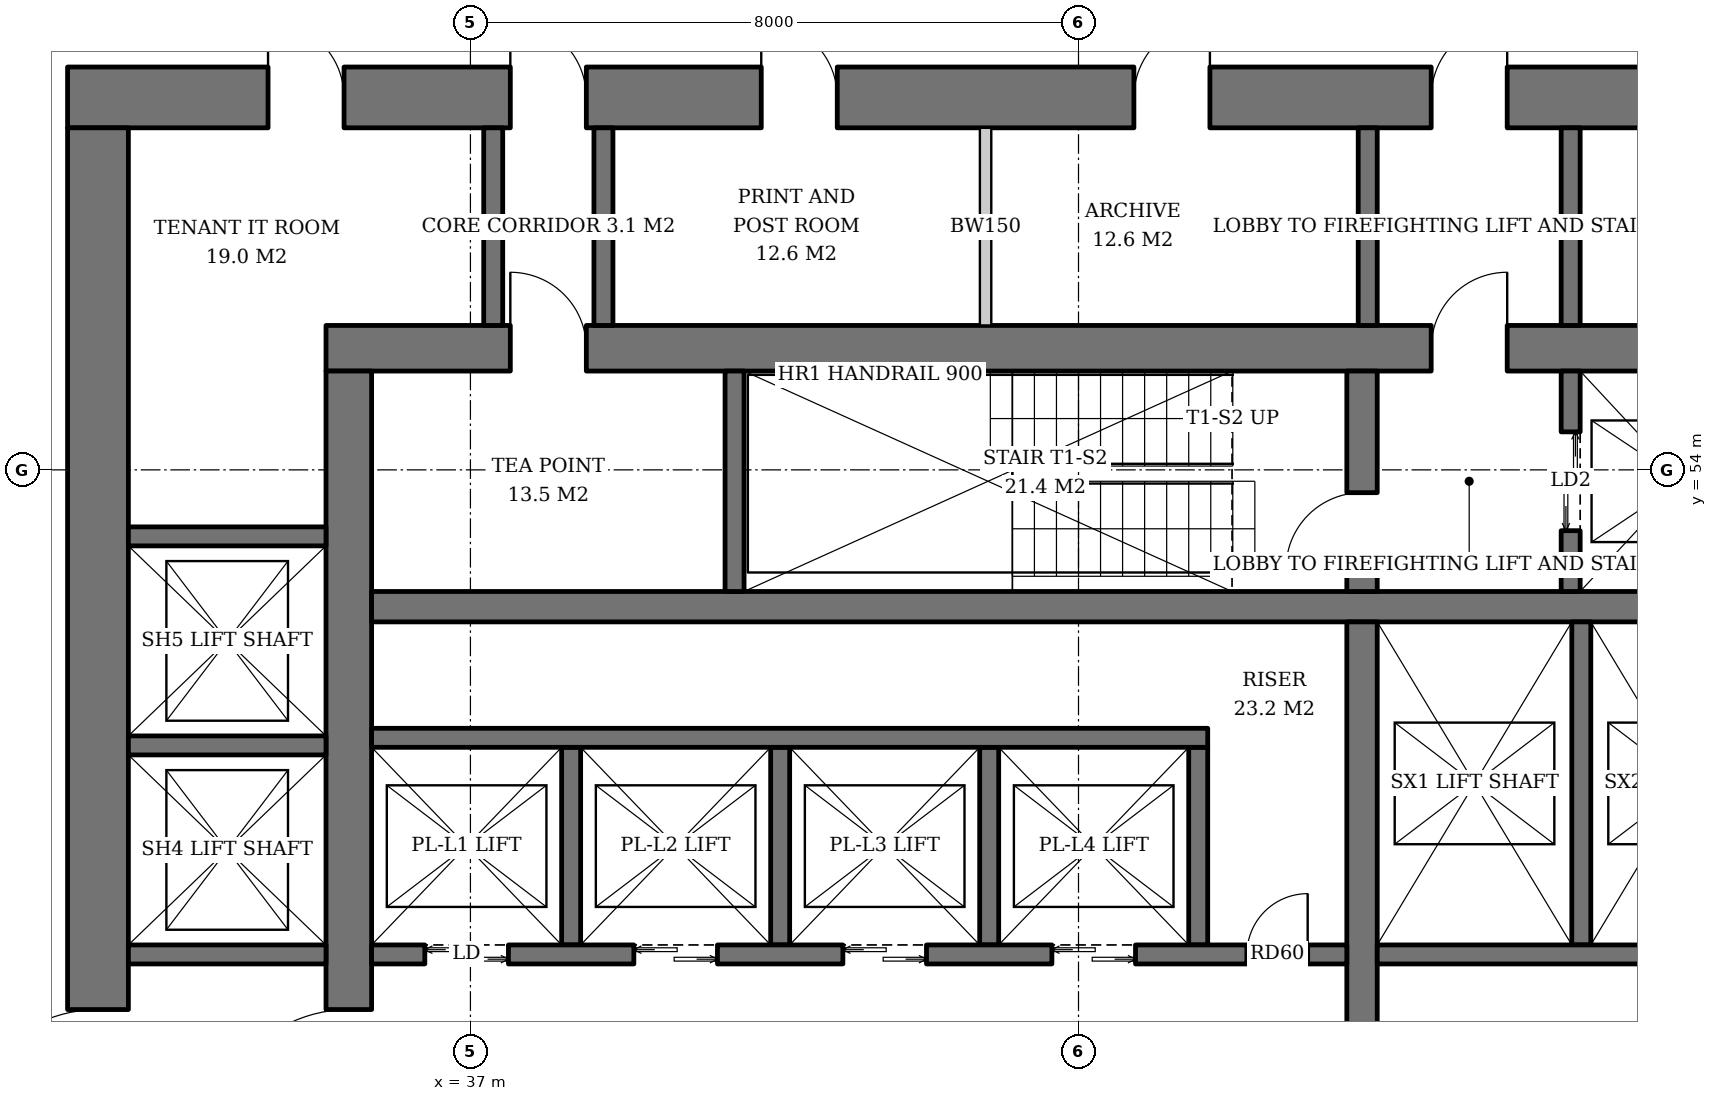
"""IFC4 building model, lengths in metres.
Left out: names, types, materials, properties, quantities, classifications, styles, units other than length and angle.
Written with IfcOpenShell. Run it as: python <this file> out.ifc"""

import sys

from ifc_helpers import new_model, si_unit, direction, frame, frame_2d, origin, place, context, subcontext, project, spatial, rectangle, extrude, element, fill, save


model = new_model("IFC4")
c1 = context("Model", 3, precision=1e-05, world=origin(), true_north=direction((0.0, 1.0)))
c2 = subcontext(c1, "Body", "Model", "MODEL_VIEW")
j1 = project(units=[si_unit("LENGTHUNIT", "METRE"), si_unit("PLANEANGLEUNIT", "RADIAN")], contexts=[c1])
p1 = place(None, origin())
s1 = spatial("IfcSite", under=j1, at=p1, CompositionType="ELEMENT")
p2 = place(p1, origin())
s2 = spatial("IfcBuilding", under=s1, at=p2, CompositionType="ELEMENT")
p3 = place(p2, frame((0.0, 0.0, 24.8)))
s3 = spatial("IfcBuildingStorey", under=s2, at=p3, CompositionType="ELEMENT", Elevation=24.8)
p4 = place(p3, frame((35.1, 55.6, 0.0), z_axis=(0.0, 0.0, 1.0), x_axis=(1.0, 0.0, 0.0)))
e1 = element("IfcWall", 1, at=p4, inside=s3, PredefinedType="SHEAR", context=c2, shape_type="SweptSolid", body=[
    extrude(rectangle(XDim=19.8, YDim=0.6, at=frame_2d((9.9, 0.0))), origin(), (0.0, 0.0, 1.0), 3.8),
])
p5 = place(p4, frame((14.54, 0.0, 0.0)))
e2 = element("IfcOpeningElement", 2, at=p5, cuts=e1, PredefinedType="OPENING", context=c2, shape_type="SweptSolid", body=[
    extrude(rectangle(XDim=1.0, YDim=2.1, at=frame_2d((0.5, 1.05))), frame((0.0, 0.31, 0.0), z_axis=(0.0, -1.0, 0.0), x_axis=(1.0, 0.0, 0.0)), (0.0, 0.0, 1.0), 0.62),
])
p6 = place(p4, frame((2.425, 0.0, 0.0)))
e3 = element("IfcOpeningElement", 3, at=p6, cuts=e1, PredefinedType="OPENING", context=c2, shape_type="SweptSolid", body=[
    extrude(rectangle(XDim=1.0, YDim=2.1, at=frame_2d((0.5, 1.05))), frame((0.0, 0.31, 0.0), z_axis=(0.0, -1.0, 0.0), x_axis=(1.0, 0.0, 0.0)), (0.0, 0.0, 1.0), 0.62),
])
p7 = place(p3, frame((35.4, 36.7, 0.0), z_axis=(0.0, 0.0, 1.0), x_axis=(0.0, 1.0, 0.0)))
e4 = element("IfcWall", 4, at=p7, inside=s3, PredefinedType="SHEAR", context=c2, shape_type="SweptSolid", body=[
    extrude(rectangle(XDim=18.6, YDim=0.6, at=frame_2d((9.3, 0.0))), origin(), (0.0, 0.0, 1.0), 3.8),
])
p8 = place(p7, frame((8.4, 0.0, 0.0)))
e5 = element("IfcOpeningElement", 5, at=p8, cuts=e4, PredefinedType="OPENING", context=c2, shape_type="SweptSolid", body=[
    extrude(rectangle(XDim=1.8, YDim=2.4, at=frame_2d((0.9, 1.2))), frame((0.0, 0.31, 0.0), z_axis=(0.0, -1.0, 0.0), x_axis=(1.0, 0.0, 0.0)), (0.0, 0.0, 1.0), 0.62),
])
p9 = place(p3, frame((31.7, 58.9, 0.0), z_axis=(0.0, 0.0, 1.0), x_axis=(1.0, 0.0, 0.0)))
e6 = element("IfcWall", 6, at=p9, inside=s3, PredefinedType="SHEAR", context=c2, shape_type="SweptSolid", body=[
    extrude(rectangle(XDim=26.6, YDim=0.8, at=frame_2d((13.3, 0.0))), origin(), (0.0, 0.0, 1.0), 3.8),
])
p10 = place(p9, frame((17.94, 0.0, 0.0)))
e7 = element("IfcOpeningElement", 7, at=p10, cuts=e6, PredefinedType="OPENING", context=c2, shape_type="SweptSolid", body=[
    extrude(rectangle(XDim=1.0, YDim=2.1, at=frame_2d((0.5, 1.05))), frame((0.0, 0.41, 0.0), z_axis=(0.0, -1.0, 0.0), x_axis=(1.0, 0.0, 0.0)), (0.0, 0.0, 1.0), 0.82),
])
p11 = place(p9, frame((5.825, 0.0, 0.0)))
e8 = element("IfcOpeningElement", 8, at=p11, cuts=e6, PredefinedType="OPENING", context=c2, shape_type="SweptSolid", body=[
    extrude(rectangle(XDim=1.0, YDim=2.1, at=frame_2d((0.5, 1.05))), frame((0.0, 0.41, 0.0), z_axis=(0.0, -1.0, 0.0), x_axis=(1.0, 0.0, 0.0)), (0.0, 0.0, 1.0), 0.82),
])
p12 = place(p9, frame((2.637, 0.0, 0.0)))
e9 = element("IfcOpeningElement", 9, at=p12, cuts=e6, PredefinedType="OPENING", context=c2, shape_type="SweptSolid", body=[
    extrude(rectangle(XDim=1.0, YDim=2.1, at=frame_2d((0.5, 1.05))), frame((0.0, 0.41, 0.0), z_axis=(0.0, -1.0, 0.0), x_axis=(1.0, 0.0, 0.0)), (0.0, 0.0, 1.0), 0.82),
])
p13 = place(p9, frame((9.126, 0.0, 0.0)))
e10 = element("IfcOpeningElement", 10, at=p13, cuts=e6, PredefinedType="OPENING", context=c2, shape_type="SweptSolid", body=[
    extrude(rectangle(XDim=1.0, YDim=2.1, at=frame_2d((0.5, 1.05))), frame((0.0, 0.41, 0.0), z_axis=(0.0, -1.0, 0.0), x_axis=(1.0, 0.0, 0.0)), (0.0, 0.0, 1.0), 0.82),
])
p14 = place(p9, frame((14.029, 0.0, 0.0)))
e11 = element("IfcOpeningElement", 11, at=p14, cuts=e6, PredefinedType="OPENING", context=c2, shape_type="SweptSolid", body=[
    extrude(rectangle(XDim=1.0, YDim=2.1, at=frame_2d((0.5, 1.05))), frame((0.0, 0.41, 0.0), z_axis=(0.0, -1.0, 0.0), x_axis=(1.0, 0.0, 0.0)), (0.0, 0.0, 1.0), 0.82),
])
p15 = place(p9, frame((22.35, 0.0, 0.0)))
e12 = element("IfcOpeningElement", 12, at=p15, cuts=e6, PredefinedType="OPENING", context=c2, shape_type="SweptSolid", body=[
    extrude(rectangle(XDim=1.0, YDim=2.1, at=frame_2d((0.5, 1.05))), frame((0.0, 0.41, 0.0), z_axis=(0.0, -1.0, 0.0), x_axis=(1.0, 0.0, 0.0)), (0.0, 0.0, 1.0), 0.82),
])
p16 = place(p3, frame((32.1, 33.5, 0.0), z_axis=(0.0, 0.0, 1.0), x_axis=(0.0, 1.0, 0.0)))
e13 = element("IfcWall", 13, at=p16, inside=s3, PredefinedType="SHEAR", context=c2, shape_type="SweptSolid", body=[
    extrude(rectangle(XDim=25.0, YDim=0.8, at=frame_2d((12.5, 0.0))), origin(), (0.0, 0.0, 1.0), 3.8),
])
p17 = place(p16, frame((11.6, 0.0, 0.0)))
e14 = element("IfcOpeningElement", 14, at=p17, cuts=e13, PredefinedType="OPENING", context=c2, shape_type="SweptSolid", body=[
    extrude(rectangle(XDim=1.8, YDim=2.4, at=frame_2d((0.9, 1.2))), frame((0.0, 0.41, 0.0), z_axis=(0.0, -1.0, 0.0), x_axis=(1.0, 0.0, 0.0)), (0.0, 0.0, 1.0), 0.82),
])
p18 = place(p3, frame((35.7, 52.2, 0.0), z_axis=(0.0, 0.0, 1.0), x_axis=(1.0, 0.0, 0.0)))
e15 = element("IfcWall", 15, at=p18, inside=s3, PredefinedType="SHEAR", context=c2, shape_type="SweptSolid", body=[
    extrude(rectangle(XDim=18.6, YDim=0.4, at=frame_2d((9.3, 0.0))), origin(), (0.0, 0.0, 1.0), 3.8),
])
p19 = place(p3, frame((48.73, 40.0, 0.0), z_axis=(0.0, 0.0, 1.0), x_axis=(0.0, 1.0, 0.0)))
e16 = element("IfcWall", 16, at=p19, inside=s3, PredefinedType="SHEAR", context=c2, shape_type="SweptSolid", body=[
    extrude(rectangle(XDim=12.0, YDim=0.4, at=frame_2d((6.0, 0.0))), origin(), (0.0, 0.0, 1.0), 3.8),
])
p20 = place(p3, frame((48.73, 52.4, 0.0), z_axis=(0.0, 0.0, 1.0), x_axis=(0.0, 1.0, 0.0)))
e17 = element("IfcWall", 17, at=p20, inside=s3, PredefinedType="SHEAR", context=c2, shape_type="SweptSolid", body=[
    extrude(rectangle(XDim=2.9, YDim=0.4, at=frame_2d((1.45, 0.0))), origin(), (0.0, 0.0, 1.0), 3.8),
])
p21 = place(p20, frame((0.3, 0.0, 0.0)))
e18 = element("IfcOpeningElement", 18, at=p21, cuts=e17, PredefinedType="OPENING", context=c2, shape_type="SweptSolid", body=[
    extrude(rectangle(XDim=1.0, YDim=2.1, at=frame_2d((0.5, 1.05))), frame((0.0, 0.21, 0.0), z_axis=(0.0, -1.0, 0.0), x_axis=(1.0, 0.0, 0.0)), (0.0, 0.0, 1.0), 0.42),
])
p22 = place(p3, frame((40.475, 52.4, 0.0), z_axis=(0.0, 0.0, 1.0), x_axis=(0.0, 1.0, 0.0)))
e19 = element("IfcWall", 19, at=p22, inside=s3, PredefinedType="SHEAR", context=c2, shape_type="SweptSolid", body=[
    extrude(rectangle(XDim=2.9, YDim=0.25, at=frame_2d((1.45, 0.0))), origin(), (0.0, 0.0, 1.0), 3.8),
])
p23 = place(p3, frame((51.475, 52.4, 0.0), z_axis=(0.0, 0.0, 1.0), x_axis=(0.0, 1.0, 0.0)))
e20 = element("IfcWall", 20, at=p23, inside=s3, PredefinedType="SHEAR", context=c2, shape_type="SweptSolid", body=[
    extrude(rectangle(XDim=2.9, YDim=0.25, at=frame_2d((1.45, 0.0))), origin(), (0.0, 0.0, 1.0), 3.8),
])
p24 = place(p23, frame((0.8, 0.0, 0.0)))
e21 = element("IfcOpeningElement", 21, at=p24, cuts=e20, PredefinedType="OPENING", context=c2, shape_type="SweptSolid", body=[
    extrude(rectangle(XDim=1.3, YDim=2.2, at=frame_2d((0.65, 1.1))), frame((0.0, 0.135, 0.0), z_axis=(0.0, -1.0, 0.0), x_axis=(1.0, 0.0, 0.0)), (0.0, 0.0, 1.0), 0.27),
])
for number, where, z_axis, x_axis in (
    (22, (38.325, 47.75, 0.0), (0.0, 0.0, 1.0), (0.0, 1.0, 0.0)),
    (23, (41.075, 47.75, 0.0), (0.0, 0.0, 1.0), (0.0, 1.0, 0.0)),
    (24, (43.825, 47.75, 0.0), (0.0, 0.0, 1.0), (0.0, 1.0, 0.0)),
    (25, (46.575, 47.75, 0.0), (0.0, 0.0, 1.0), (0.0, 1.0, 0.0)),
):
    element("IfcWall", number, at=place(p3, frame(where, z_axis=z_axis, x_axis=x_axis)), inside=s3, PredefinedType="SHEAR", context=c2, shape_type="SweptSolid", body=[
        extrude(rectangle(XDim=2.6, YDim=0.25, at=frame_2d((1.3, 0.0))), origin(), (0.0, 0.0, 1.0), 3.8),
    ])
p25 = place(p3, frame((35.7, 50.475, 0.0), z_axis=(0.0, 0.0, 1.0), x_axis=(1.0, 0.0, 0.0)))
e26 = element("IfcWall", 26, at=p25, inside=s3, PredefinedType="SHEAR", context=c2, shape_type="SweptSolid", body=[
    extrude(rectangle(XDim=11.0, YDim=0.25, at=frame_2d((5.5, 0.0))), origin(), (0.0, 0.0, 1.0), 3.8),
])
p26 = place(p3, frame((35.7, 47.625, 0.0), z_axis=(0.0, 0.0, 1.0), x_axis=(1.0, 0.0, 0.0)))
e27 = element("IfcWall", 27, at=p26, inside=s3, PredefinedType="SHEAR", context=c2, shape_type="SweptSolid", body=[
    extrude(rectangle(XDim=12.83, YDim=0.25, at=frame_2d((6.415, 0.0))), origin(), (0.0, 0.0, 1.0), 3.8),
])
p27 = place(p26, frame((0.7, 0.0, 0.0)))
e28 = element("IfcOpeningElement", 28, at=p27, cuts=e27, PredefinedType="OPENING", context=c2, shape_type="SweptSolid", body=[
    extrude(rectangle(XDim=1.1, YDim=2.2, at=frame_2d((0.55, 1.1))), frame((0.0, 0.135, 0.0), z_axis=(0.0, -1.0, 0.0), x_axis=(1.0, 0.0, 0.0)), (0.0, 0.0, 1.0), 0.27),
])
p28 = place(p26, frame((3.45, 0.0, 0.0)))
e29 = element("IfcOpeningElement", 29, at=p28, cuts=e27, PredefinedType="OPENING", context=c2, shape_type="SweptSolid", body=[
    extrude(rectangle(XDim=1.1, YDim=2.2, at=frame_2d((0.55, 1.1))), frame((0.0, 0.135, 0.0), z_axis=(0.0, -1.0, 0.0), x_axis=(1.0, 0.0, 0.0)), (0.0, 0.0, 1.0), 0.27),
])
p29 = place(p26, frame((6.2, 0.0, 0.0)))
e30 = element("IfcOpeningElement", 30, at=p29, cuts=e27, PredefinedType="OPENING", context=c2, shape_type="SweptSolid", body=[
    extrude(rectangle(XDim=1.1, YDim=2.2, at=frame_2d((0.55, 1.1))), frame((0.0, 0.135, 0.0), z_axis=(0.0, -1.0, 0.0), x_axis=(1.0, 0.0, 0.0)), (0.0, 0.0, 1.0), 0.27),
])
p30 = place(p26, frame((8.95, 0.0, 0.0)))
e31 = element("IfcOpeningElement", 31, at=p30, cuts=e27, PredefinedType="OPENING", context=c2, shape_type="SweptSolid", body=[
    extrude(rectangle(XDim=1.1, YDim=2.2, at=frame_2d((0.55, 1.1))), frame((0.0, 0.135, 0.0), z_axis=(0.0, -1.0, 0.0), x_axis=(1.0, 0.0, 0.0)), (0.0, 0.0, 1.0), 0.27),
])
p31 = place(p26, frame((11.515, 0.0, 0.0)))
e32 = element("IfcOpeningElement", 32, at=p31, cuts=e27, PredefinedType="OPENING", context=c2, shape_type="SweptSolid", body=[
    extrude(rectangle(XDim=0.8, YDim=2.0, at=frame_2d((0.4, 1.0))), frame((0.0, 0.135, 0.0), z_axis=(0.0, -1.0, 0.0), x_axis=(1.0, 0.0, 0.0)), (0.0, 0.0, 1.0), 0.27),
])
p32 = place(p3, frame((51.615, 47.75, 0.0), z_axis=(0.0, 0.0, 1.0), x_axis=(0.0, 1.0, 0.0)))
e33 = element("IfcWall", 33, at=p32, inside=s3, PredefinedType="SHEAR", context=c2, shape_type="SweptSolid", body=[
    extrude(rectangle(XDim=4.25, YDim=0.25, at=frame_2d((2.125, 0.0))), origin(), (0.0, 0.0, 1.0), 3.8),
])
p33 = place(p3, frame((48.93, 47.625, 0.0), z_axis=(0.0, 0.0, 1.0), x_axis=(1.0, 0.0, 0.0)))
e34 = element("IfcWall", 34, at=p33, inside=s3, PredefinedType="SHEAR", context=c2, shape_type="SweptSolid", body=[
    extrude(rectangle(XDim=5.37, YDim=0.25, at=frame_2d((2.685, 0.0))), origin(), (0.0, 0.0, 1.0), 3.8),
])
for number, where, z_axis, x_axis in (
    (35, (32.5, 47.625, 0.0), (0.0, 0.0, 1.0), (1.0, 0.0, 0.0)),
    (36, (32.5, 50.375, 0.0), (0.0, 0.0, 1.0), (1.0, 0.0, 0.0)),
    (37, (32.5, 53.125, 0.0), (0.0, 0.0, 1.0), (1.0, 0.0, 0.0)),
):
    element("IfcWall", number, at=place(p3, frame(where, z_axis=z_axis, x_axis=x_axis)), inside=s3, PredefinedType="SHEAR", context=c2, shape_type="SweptSolid", body=[
        extrude(rectangle(XDim=2.6, YDim=0.25, at=frame_2d((1.3, 0.0))), origin(), (0.0, 0.0, 1.0), 3.8),
    ])
for number, where, z_axis, x_axis in (
    (38, (48.805, 55.9, 0.0), (0.0, 0.0, 1.0), (0.0, 1.0, 0.0)),
    (39, (51.475, 55.9, 0.0), (0.0, 0.0, 1.0), (0.0, 1.0, 0.0)),
    (40, (37.3, 55.9, 0.0), (0.0, 0.0, 1.0), (0.0, 1.0, 0.0)),
    (41, (38.75, 55.9, 0.0), (0.0, 0.0, 1.0), (0.0, 1.0, 0.0)),
):
    element("IfcWall", number, at=place(p3, frame(where, z_axis=z_axis, x_axis=x_axis)), inside=s3, PredefinedType="SOLIDWALL", context=c2, shape_type="SweptSolid", body=[
        extrude(rectangle(XDim=2.6, YDim=0.25, at=frame_2d((1.3, 0.0))), origin(), (0.0, 0.0, 1.0), 3.62),
    ])
p34 = place(p3, frame((43.778, 55.9, 0.0), z_axis=(0.0, 0.0, 1.0), x_axis=(0.0, 1.0, 0.0)))
e42 = element("IfcWall", 42, at=p34, inside=s3, PredefinedType="SOLIDWALL", context=c2, shape_type="SweptSolid", body=[
    extrude(rectangle(XDim=2.6, YDim=0.15, at=frame_2d((1.3, 0.0))), origin(), (0.0, 0.0, 1.0), 3.62),
])
p35 = place(p24, origin())
e43 = element("IfcDoor", 43, at=p35, inside=s3, OperationType="DOUBLE_DOOR_SLIDING", PredefinedType="DOOR", context=c2, shape_type="SweptSolid", body=[
    extrude(rectangle(XDim=1.3, YDim=2.2, at=frame_2d((0.65, 1.1))), frame((0.0, 0.025, 0.0), z_axis=(0.0, -1.0, 0.0), x_axis=(1.0, 0.0, 0.0)), (0.0, 0.0, 1.0), 0.05),
])
fill(e21, e43)
p36 = place(p27, origin())
e44 = element("IfcDoor", 44, at=p36, inside=s3, OperationType="DOUBLE_DOOR_SLIDING", PredefinedType="DOOR", context=c2, shape_type="SweptSolid", body=[
    extrude(rectangle(XDim=1.1, YDim=2.2, at=frame_2d((0.55, 1.1))), frame((0.0, 0.025, 0.0), z_axis=(0.0, -1.0, 0.0), x_axis=(1.0, 0.0, 0.0)), (0.0, 0.0, 1.0), 0.05),
])
fill(e28, e44)
p37 = place(p28, origin())
e45 = element("IfcDoor", 45, at=p37, inside=s3, OperationType="DOUBLE_DOOR_SLIDING", PredefinedType="DOOR", context=c2, shape_type="SweptSolid", body=[
    extrude(rectangle(XDim=1.1, YDim=2.2, at=frame_2d((0.55, 1.1))), frame((0.0, 0.025, 0.0), z_axis=(0.0, -1.0, 0.0), x_axis=(1.0, 0.0, 0.0)), (0.0, 0.0, 1.0), 0.05),
])
fill(e29, e45)
p38 = place(p29, origin())
e46 = element("IfcDoor", 46, at=p38, inside=s3, OperationType="DOUBLE_DOOR_SLIDING", PredefinedType="DOOR", context=c2, shape_type="SweptSolid", body=[
    extrude(rectangle(XDim=1.1, YDim=2.2, at=frame_2d((0.55, 1.1))), frame((0.0, 0.025, 0.0), z_axis=(0.0, -1.0, 0.0), x_axis=(1.0, 0.0, 0.0)), (0.0, 0.0, 1.0), 0.05),
])
fill(e30, e46)
p39 = place(p30, origin())
e47 = element("IfcDoor", 47, at=p39, inside=s3, OperationType="DOUBLE_DOOR_SLIDING", PredefinedType="DOOR", context=c2, shape_type="SweptSolid", body=[
    extrude(rectangle(XDim=1.1, YDim=2.2, at=frame_2d((0.55, 1.1))), frame((0.0, 0.025, 0.0), z_axis=(0.0, -1.0, 0.0), x_axis=(1.0, 0.0, 0.0)), (0.0, 0.0, 1.0), 0.05),
])
fill(e31, e47)
p40 = place(p31, origin())
e48 = element("IfcDoor", 48, at=p40, inside=s3, OperationType="SINGLE_SWING_RIGHT", PredefinedType="DOOR", context=c2, shape_type="SweptSolid", body=[
    extrude(rectangle(XDim=0.8, YDim=2.0, at=frame_2d((0.4, 1.0))), frame((0.0, 0.025, 0.0), z_axis=(0.0, -1.0, 0.0), x_axis=(1.0, 0.0, 0.0)), (0.0, 0.0, 1.0), 0.05),
])
fill(e32, e48)
p41 = place(p21, origin())
e49 = element("IfcDoor", 49, at=p41, inside=s3, OperationType="SINGLE_SWING_LEFT", PredefinedType="DOOR", context=c2, shape_type="SweptSolid", body=[
    extrude(rectangle(XDim=1.0, YDim=2.1, at=frame_2d((0.5, 1.05))), frame((0.0, 0.025, 0.0), z_axis=(0.0, -1.0, 0.0), x_axis=(1.0, 0.0, 0.0)), (0.0, 0.0, 1.0), 0.05),
])
fill(e18, e49)
p42 = place(p5, origin())
e50 = element("IfcDoor", 50, at=p42, inside=s3, OperationType="SINGLE_SWING_RIGHT", PredefinedType="DOOR", context=c2, shape_type="SweptSolid", body=[
    extrude(rectangle(XDim=1.0, YDim=2.1, at=frame_2d((0.5, 1.05))), frame((0.0, 0.025, 0.0), z_axis=(0.0, -1.0, 0.0), x_axis=(1.0, 0.0, 0.0)), (0.0, 0.0, 1.0), 0.05),
])
fill(e2, e50)
p43 = place(p8, origin())
e51 = element("IfcDoor", 51, at=p43, inside=s3, OperationType="DOUBLE_DOOR_SINGLE_SWING", PredefinedType="DOOR", context=c2, shape_type="SweptSolid", body=[
    extrude(rectangle(XDim=1.8, YDim=2.4, at=frame_2d((0.9, 1.2))), frame((0.0, 0.025, 0.0), z_axis=(0.0, -1.0, 0.0), x_axis=(1.0, 0.0, 0.0)), (0.0, 0.0, 1.0), 0.05),
])
fill(e5, e51)
p44 = place(p17, origin())
e52 = element("IfcDoor", 52, at=p44, inside=s3, OperationType="DOUBLE_DOOR_SINGLE_SWING", PredefinedType="DOOR", context=c2, shape_type="SweptSolid", body=[
    extrude(rectangle(XDim=1.8, YDim=2.4, at=frame_2d((0.9, 1.2))), frame((0.0, 0.025, 0.0), z_axis=(0.0, -1.0, 0.0), x_axis=(1.0, 0.0, 0.0)), (0.0, 0.0, 1.0), 0.05),
])
fill(e14, e52)
p45 = place(p10, origin())
e53 = element("IfcDoor", 53, at=p45, inside=s3, OperationType="SINGLE_SWING_RIGHT", PredefinedType="DOOR", context=c2, shape_type="SweptSolid", body=[
    extrude(rectangle(XDim=1.0, YDim=2.1, at=frame_2d((0.5, 1.05))), frame((0.0, 0.025, 0.0), z_axis=(0.0, -1.0, 0.0), x_axis=(1.0, 0.0, 0.0)), (0.0, 0.0, 1.0), 0.05),
])
fill(e7, e53)
p46 = place(p11, origin())
e54 = element("IfcDoor", 54, at=p46, inside=s3, OperationType="SINGLE_SWING_LEFT", PredefinedType="DOOR", context=c2, shape_type="SweptSolid", body=[
    extrude(rectangle(XDim=1.0, YDim=2.1, at=frame_2d((0.5, 1.05))), frame((0.0, 0.025, 0.0), z_axis=(0.0, -1.0, 0.0), x_axis=(1.0, 0.0, 0.0)), (0.0, 0.0, 1.0), 0.05),
])
fill(e8, e54)
p47 = place(p6, origin())
e55 = element("IfcDoor", 55, at=p47, inside=s3, OperationType="SINGLE_SWING_LEFT", PredefinedType="DOOR", context=c2, shape_type="SweptSolid", body=[
    extrude(rectangle(XDim=1.0, YDim=2.1, at=frame_2d((0.5, 1.05))), frame((0.0, -0.24, 0.0), z_axis=(0.0, -1.0, 0.0), x_axis=(1.0, 0.0, 0.0)), (0.0, 0.0, 1.0), 0.05),
])
fill(e3, e55)
p48 = place(p12, origin())
e56 = element("IfcDoor", 56, at=p48, inside=s3, OperationType="SINGLE_SWING_LEFT", PredefinedType="DOOR", context=c2, shape_type="SweptSolid", body=[
    extrude(rectangle(XDim=1.0, YDim=2.1, at=frame_2d((0.5, 1.05))), frame((0.0, -0.34, 0.0), z_axis=(0.0, -1.0, 0.0), x_axis=(1.0, 0.0, 0.0)), (0.0, 0.0, 1.0), 0.05),
])
fill(e9, e56)
p49 = place(p13, origin())
e57 = element("IfcDoor", 57, at=p49, inside=s3, OperationType="SINGLE_SWING_LEFT", PredefinedType="DOOR", context=c2, shape_type="SweptSolid", body=[
    extrude(rectangle(XDim=1.0, YDim=2.1, at=frame_2d((0.5, 1.05))), frame((0.0, -0.34, 0.0), z_axis=(0.0, -1.0, 0.0), x_axis=(1.0, 0.0, 0.0)), (0.0, 0.0, 1.0), 0.05),
])
fill(e10, e57)
p50 = place(p14, origin())
e58 = element("IfcDoor", 58, at=p50, inside=s3, OperationType="SINGLE_SWING_RIGHT", PredefinedType="DOOR", context=c2, shape_type="SweptSolid", body=[
    extrude(rectangle(XDim=1.0, YDim=2.1, at=frame_2d((0.5, 1.05))), frame((0.0, -0.34, 0.0), z_axis=(0.0, -1.0, 0.0), x_axis=(1.0, 0.0, 0.0)), (0.0, 0.0, 1.0), 0.05),
])
fill(e11, e58)
save(model, sys.argv[1])
